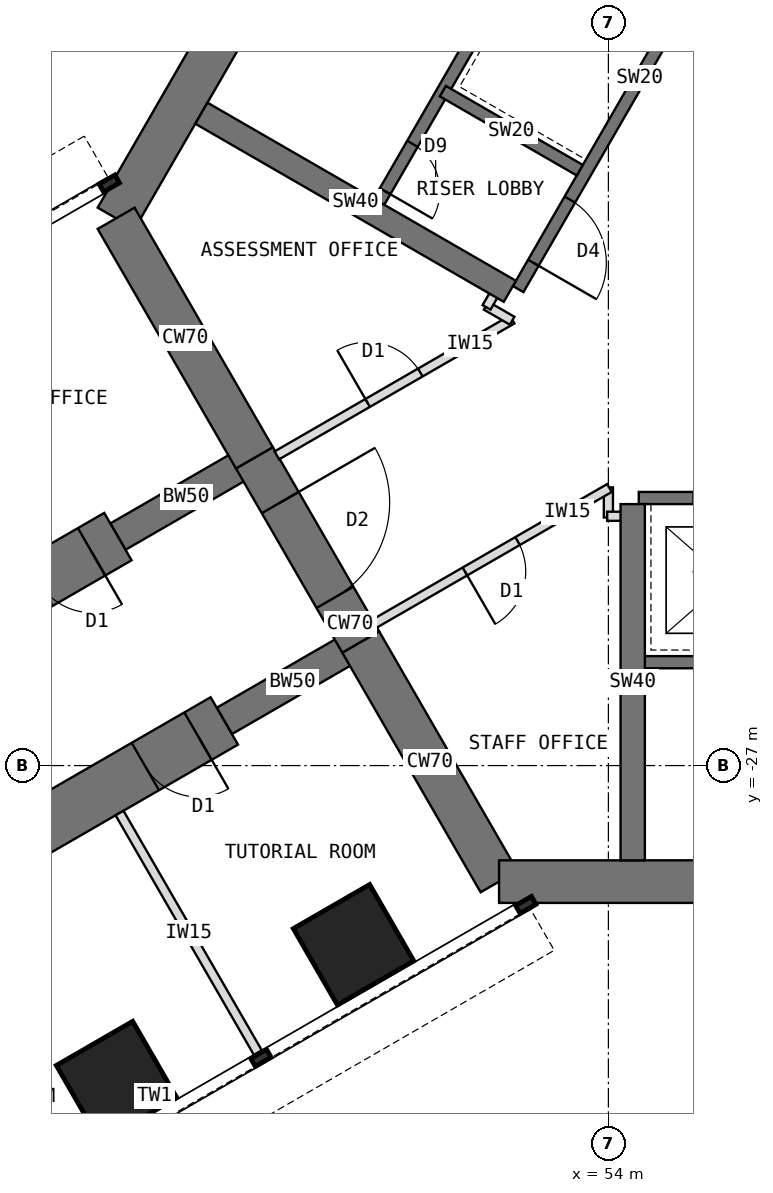
"""IFC4 building model, lengths in metres.
Left out: names, types, materials, properties, quantities, classifications, styles, units other than length and angle.
Written with IfcOpenShell. Run it as: python <this file> out.ifc"""

import sys

from ifc_helpers import new_model, si_unit, direction, frame, frame_2d, origin, origin_2d, place, context, subcontext, project, spatial, rectangle, extrude, element, fill, save


model = new_model("IFC4")
c1 = context("Model", 3, precision=1e-05, world=origin(), true_north=direction((0.0, 1.0)))
c2 = subcontext(c1, "Body", "Model", "MODEL_VIEW")
j1 = project(units=[si_unit("LENGTHUNIT", "METRE"), si_unit("PLANEANGLEUNIT", "RADIAN")], contexts=[c1])
p1 = place(None, origin())
s1 = spatial("IfcSite", under=j1, at=p1, CompositionType="ELEMENT")
p2 = place(p1, origin())
s2 = spatial("IfcBuilding", under=s1, at=p2, CompositionType="ELEMENT")
p3 = place(p2, frame((0.0, 0.0, 48.5)))
s3 = spatial("IfcBuildingStorey", under=s2, at=p3, CompositionType="ELEMENT", Elevation=48.5)
p4 = place(p3, frame((52.202, -7.092, 0.0), z_axis=(0.0, 0.0, 1.0), x_axis=(-0.500005998175, -0.866021940709, 0.0)))
e1 = element("IfcWall", 1, at=p4, inside=s3, PredefinedType="SHEAR", context=c2, shape_type="SweptSolid", body=[
    extrude(rectangle(XDim=12.596, YDim=0.7, at=frame_2d((6.298, 0.0))), origin(), (0.0, 0.0, 1.0), 4.0),
])
p5 = place(p3, frame((45.904, -18.0, 0.0), z_axis=(0.0, 0.0, 1.0), x_axis=(0.500024481964, -0.866011268655, 0.0)))
e2 = element("IfcWall", 2, at=p5, inside=s3, PredefinedType="SHEAR", context=c2, shape_type="SweptSolid", body=[
    extrude(rectangle(XDim=4.548, YDim=0.7, at=frame_2d((2.274, 0.0))), origin(), (0.0, 0.0, 1.0), 4.0),
])
p6 = place(p3, frame((48.178, -21.939, 0.0), z_axis=(0.0, 0.0, 1.0), x_axis=(0.500010275428, -0.866019471182, 0.0)))
e3 = element("IfcWall", 3, at=p6, inside=s3, PredefinedType="SHEAR", context=c2, shape_type="SweptSolid", body=[
    extrude(rectangle(XDim=3.5, YDim=0.7, at=frame_2d((1.75, 0.0))), origin(), (0.0, 0.0, 1.0), 4.0),
])
p7 = place(p6, frame((0.85, 0.0, 0.0)))
e4 = element("IfcOpeningElement", 4, at=p7, cuts=e3, PredefinedType="OPENING", context=c2, shape_type="SweptSolid", body=[
    extrude(rectangle(XDim=1.8, YDim=2.1, at=frame_2d((0.9, 1.05))), frame((0.0, 0.36, 0.0), z_axis=(0.0, -1.0, 0.0), x_axis=(1.0, 0.0, 0.0)), (0.0, 0.0, 1.0), 0.72),
])
p8 = place(p3, frame((49.928, -24.97, 0.0), z_axis=(0.0, 0.0, 1.0), x_axis=(0.499984222037, -0.866034513004, 0.0)))
e5 = element("IfcWall", 5, at=p8, inside=s3, PredefinedType="SHEAR", context=c2, shape_type="SweptSolid", body=[
    extrude(rectangle(XDim=4.548, YDim=0.7, at=frame_2d((2.274, 0.0))), origin(), (0.0, 0.0, 1.0), 4.0),
])
p9 = place(p3, frame((52.202, -28.908, 0.0), z_axis=(0.0, 0.0, 1.0), x_axis=(1.0, 0.0, 0.0)))
e6 = element("IfcWall", 6, at=p9, inside=s3, PredefinedType="SHEAR", context=c2, shape_type="SweptSolid", body=[
    extrude(rectangle(XDim=12.596, YDim=0.7, at=frame_2d((6.298, 0.0))), origin(), (0.0, 0.0, 1.0), 4.0),
])
p10 = place(p3, frame((49.928, -24.97, 0.0), z_axis=(0.0, 0.0, 1.0), x_axis=(-0.866031863473, -0.499988811324, 0.0)))
e7 = element("IfcWall", 7, at=p10, inside=s3, PredefinedType="SHEAR", context=c2, shape_type="SweptSolid", body=[
    extrude(rectangle(XDim=2.592, YDim=0.5, at=frame_2d((1.296, 0.0))), origin(), (0.0, 0.0, 1.0), 4.0),
])
p11 = place(p3, frame((47.684, -26.266, 0.0), z_axis=(0.0, 0.0, 1.0), x_axis=(-0.866027579429, -0.499996231654, 0.0)))
e8 = element("IfcWall", 8, at=p11, inside=s3, PredefinedType="SHEAR", context=c2, shape_type="SweptSolid", body=[
    extrude(rectangle(XDim=13.2, YDim=0.9, at=frame_2d((6.6, 0.0))), origin(), (0.0, 0.0, 1.0), 4.0),
])
p12 = place(p11, frame((0.5, 0.0, 0.0)))
e9 = element("IfcOpeningElement", 9, at=p12, cuts=e8, PredefinedType="OPENING", context=c2, shape_type="SweptSolid", body=[
    extrude(rectangle(XDim=1.0, YDim=2.1, at=frame_2d((0.5, 1.05))), frame((0.0, 0.46, 0.0), z_axis=(0.0, -1.0, 0.0), x_axis=(1.0, 0.0, 0.0)), (0.0, 0.0, 1.0), 0.92),
])
p13 = place(p11, frame((7.25, 0.0, 0.0)))
e10 = element("IfcOpeningElement", 10, at=p13, cuts=e8, PredefinedType="OPENING", context=c2, shape_type="SweptSolid", body=[
    extrude(rectangle(XDim=1.0, YDim=2.1, at=frame_2d((0.5, 1.05))), frame((0.0, 0.46, 0.0), z_axis=(0.0, -1.0, 0.0), x_axis=(1.0, 0.0, 0.0)), (0.0, 0.0, 1.0), 0.92),
])
p14 = place(p3, frame((48.178, -21.939, 0.0), z_axis=(0.0, 0.0, 1.0), x_axis=(-0.866072649678, -0.499918158782, 0.0)))
e11 = element("IfcWall", 11, at=p14, inside=s3, PredefinedType="SHEAR", context=c2, shape_type="SweptSolid", body=[
    extrude(rectangle(XDim=2.592, YDim=0.5, at=frame_2d((1.296, 0.0))), origin(), (0.0, 0.0, 1.0), 4.0),
])
p15 = place(p3, frame((45.934, -23.234, 0.0), z_axis=(0.0, 0.0, 1.0), x_axis=(-0.866019570528, -0.500010103361, 0.0)))
e12 = element("IfcWall", 12, at=p15, inside=s3, PredefinedType="SHEAR", context=c2, shape_type="SweptSolid", body=[
    extrude(rectangle(XDim=13.2, YDim=0.9, at=frame_2d((6.6, 0.0))), origin(), (0.0, 0.0, 1.0), 4.0),
])
p16 = place(p15, frame((0.5, 0.0, 0.0)))
e13 = element("IfcOpeningElement", 13, at=p16, cuts=e12, PredefinedType="OPENING", context=c2, shape_type="SweptSolid", body=[
    extrude(rectangle(XDim=1.0, YDim=2.1, at=frame_2d((0.5, 1.05))), frame((0.0, 0.46, 0.0), z_axis=(0.0, -1.0, 0.0), x_axis=(1.0, 0.0, 0.0)), (0.0, 0.0, 1.0), 0.92),
])
p17 = place(p15, frame((7.25, 0.0, 0.0)))
e14 = element("IfcOpeningElement", 14, at=p17, cuts=e12, PredefinedType="OPENING", context=c2, shape_type="SweptSolid", body=[
    extrude(rectangle(XDim=1.0, YDim=2.1, at=frame_2d((0.5, 1.05))), frame((0.0, 0.46, 0.0), z_axis=(0.0, -1.0, 0.0), x_axis=(1.0, 0.0, 0.0)), (0.0, 0.0, 1.0), 0.92),
])
for number, where, z_axis, x_axis in (
    (15, (49.809, -29.946, 0.0), (0.0, 0.0, 1.0), (0.866, 0.5, 0.0)),
    (16, (45.912, -32.196, 0.0), (0.0, 0.0, 1.0), (0.866, 0.5, 0.0)),
):
    element("IfcColumn", number, at=place(p3, frame(where, z_axis=z_axis, x_axis=x_axis)), inside=s3, PredefinedType="COLUMN", context=c2, shape_type="SweptSolid", body=[
        extrude(rectangle(XDim=1.45, YDim=1.45, at=origin_2d()), origin(), (0.0, 0.0, 1.0), 4.0),
    ])
p18 = place(p3, frame((56.516, -12.236, 0.0), z_axis=(0.0, 0.0, 1.0), x_axis=(-0.49999894854, -0.866026010844, 0.0)))
e17 = element("IfcWall", 17, at=p18, inside=s3, PredefinedType="SHEAR", context=c2, shape_type="SweptSolid", body=[
    extrude(rectangle(XDim=8.0, YDim=0.2, at=frame_2d((4.0, 0.0))), origin(), (0.0, 0.0, 1.0), 4.0),
])
p19 = place(p18, frame((6.3, 0.0, 0.0)))
e18 = element("IfcOpeningElement", 18, at=p19, cuts=e17, PredefinedType="OPENING", context=c2, shape_type="SweptSolid", body=[
    extrude(rectangle(XDim=1.2, YDim=2.1, at=frame_2d((0.6, 1.05))), frame((0.0, 0.11, 0.0), z_axis=(0.0, -1.0, 0.0), x_axis=(1.0, 0.0, 0.0)), (0.0, 0.0, 1.0), 0.22),
])
p20 = place(p3, frame((53.53, -17.209, 0.0), z_axis=(0.0, 0.0, 1.0), x_axis=(-0.866062058628, 0.499936506574, 0.0)))
e19 = element("IfcWall", 19, at=p20, inside=s3, PredefinedType="SHEAR", context=c2, shape_type="SweptSolid", body=[
    extrude(rectangle(XDim=2.6, YDim=0.2, at=frame_2d((1.3, 0.0))), origin(), (0.0, 0.0, 1.0), 4.0),
])
p21 = place(p3, frame((54.178, -10.886, 0.0), z_axis=(0.0, 0.0, 1.0), x_axis=(-0.49999894854, -0.866026010844, 0.0)))
e20 = element("IfcWall", 20, at=p21, inside=s3, PredefinedType="SHEAR", context=c2, shape_type="SweptSolid", body=[
    extrude(rectangle(XDim=8.0, YDim=0.2, at=frame_2d((4.0, 0.0))), origin(), (0.0, 0.0, 1.0), 4.0),
])
p22 = place(p21, frame((6.8, 0.0, 0.0)))
e21 = element("IfcOpeningElement", 21, at=p22, cuts=e20, PredefinedType="OPENING", context=c2, shape_type="SweptSolid", body=[
    extrude(rectangle(XDim=0.9, YDim=2.1, at=frame_2d((0.45, 1.05))), frame((0.0, 0.11, 0.0), z_axis=(0.0, -1.0, 0.0), x_axis=(1.0, 0.0, 0.0)), (0.0, 0.0, 1.0), 0.22),
])
p23 = place(p3, frame((52.38, -19.201, 0.0), z_axis=(0.0, 0.0, 1.0), x_axis=(-0.866023886965, 0.500002627198, 0.0)))
e22 = element("IfcWall", 22, at=p23, inside=s3, PredefinedType="SHEAR", context=c2, shape_type="SweptSolid", body=[
    extrude(rectangle(XDim=5.858, YDim=0.4, at=frame_2d((2.929, 0.0))), origin(), (0.0, 0.0, 1.0), 4.0),
])
p24 = place(p3, frame((54.5, -22.6, 0.0), z_axis=(0.0, 0.0, 1.0), x_axis=(1.0, 0.0, 0.0)))
e23 = element("IfcWall", 23, at=p24, inside=s3, PredefinedType="SHEAR", context=c2, shape_type="SweptSolid", body=[
    extrude(rectangle(XDim=8.0, YDim=0.2, at=frame_2d((4.0, 0.0))), origin(), (0.0, 0.0, 1.0), 4.0),
])
p25 = place(p24, frame((6.3, 0.0, 0.0)))
e24 = element("IfcOpeningElement", 24, at=p25, cuts=e23, PredefinedType="OPENING", context=c2, shape_type="SweptSolid", body=[
    extrude(rectangle(XDim=1.2, YDim=2.1, at=frame_2d((0.6, 1.05))), frame((0.0, 0.11, 0.0), z_axis=(0.0, -1.0, 0.0), x_axis=(1.0, 0.0, 0.0)), (0.0, 0.0, 1.0), 0.22),
])
p26 = place(p24, frame((0.9, 0.0, 0.0)))
e25 = element("IfcOpeningElement", 25, at=p26, cuts=e23, PredefinedType="OPENING", context=c2, shape_type="SweptSolid", body=[
    extrude(rectangle(XDim=1.1, YDim=2.2, at=frame_2d((0.55, 1.1))), frame((0.0, 0.11, 0.0), z_axis=(0.0, -1.0, 0.0), x_axis=(1.0, 0.0, 0.0)), (0.0, 0.0, 1.0), 0.22),
])
p27 = place(p3, frame((54.5, -25.3, 0.0), z_axis=(0.0, 0.0, 1.0), x_axis=(1.0, 0.0, 0.0)))
e26 = element("IfcWall", 26, at=p27, inside=s3, PredefinedType="SHEAR", context=c2, shape_type="SweptSolid", body=[
    extrude(rectangle(XDim=8.0, YDim=0.2, at=frame_2d((4.0, 0.0))), origin(), (0.0, 0.0, 1.0), 4.0),
])
p28 = place(p27, frame((6.7, 0.0, 0.0)))
e27 = element("IfcOpeningElement", 27, at=p28, cuts=e26, PredefinedType="OPENING", context=c2, shape_type="SweptSolid", body=[
    extrude(rectangle(XDim=1.1, YDim=2.1, at=frame_2d((0.55, 1.05))), frame((0.0, 0.11, 0.0), z_axis=(0.0, -1.0, 0.0), x_axis=(1.0, 0.0, 0.0)), (0.0, 0.0, 1.0), 0.22),
])
p29 = place(p3, frame((54.4, -22.7, 0.0), z_axis=(0.0, 0.0, 1.0), x_axis=(0.0, -1.0, 0.0)))
e28 = element("IfcWall", 28, at=p29, inside=s3, PredefinedType="SHEAR", context=c2, shape_type="SweptSolid", body=[
    extrude(rectangle(XDim=5.858, YDim=0.4, at=frame_2d((2.929, 0.0))), origin(), (0.0, 0.0, 1.0), 4.0),
])
p30 = place(p3, frame((45.96, -27.78, 0.0), z_axis=(0.0, 0.0, 1.0), x_axis=(0.499982560684, -0.866035472144, 0.0)))
e29 = element("IfcWall", 29, at=p30, inside=s3, PredefinedType="PARTITIONING", context=c2, shape_type="SweptSolid", body=[
    extrude(rectangle(XDim=4.55, YDim=0.15, at=frame_2d((2.275, 0.0))), origin(), (0.0, 0.0, 1.0), 3.8),
])
p31 = place(p3, frame((54.0, -22.92, 0.0), z_axis=(0.0, 0.0, 1.0), x_axis=(0.0, 1.0, 0.0)))
e30 = element("IfcWall", 30, at=p31, inside=s3, PredefinedType="PARTITIONING", context=c2, shape_type="SweptSolid", body=[
    extrude(rectangle(XDim=0.494, YDim=0.15, at=frame_2d((0.247, 0.0))), origin(), (0.0, 0.0, 1.0), 3.8),
])
p32 = place(p3, frame((54.017, -22.436, 0.0), z_axis=(0.0, 0.0, 1.0), x_axis=(-0.866015446554, -0.500017246033, 0.0)))
e31 = element("IfcWall", 31, at=p32, inside=s3, PredefinedType="PARTITIONING", context=c2, shape_type="SweptSolid", body=[
    extrude(rectangle(XDim=4.469, YDim=0.15, at=frame_2d((2.234, 0.0))), origin(), (0.0, 0.0, 1.0), 3.8),
])
p33 = place(p32, frame((1.744, 0.0, 0.0)))
e32 = element("IfcOpeningElement", 32, at=p33, cuts=e31, PredefinedType="OPENING", context=c2, shape_type="SweptSolid", body=[
    extrude(rectangle(XDim=1.0, YDim=2.1, at=frame_2d((0.5, 1.05))), frame((0.0, 0.085, 0.0), z_axis=(0.0, -1.0, 0.0), x_axis=(1.0, 0.0, 0.0)), (0.0, 0.0, 1.0), 0.17),
])
p34 = place(p3, frame((48.548, -21.898, 0.0), z_axis=(0.0, 0.0, 1.0), x_axis=(0.866025445582, 0.499999927604, 0.0)))
e33 = element("IfcWall", 33, at=p34, inside=s3, PredefinedType="PARTITIONING", context=c2, shape_type="SweptSolid", body=[
    extrude(rectangle(XDim=4.468, YDim=0.15, at=frame_2d((2.234, 0.0))), origin(), (0.0, 0.0, 1.0), 3.8),
])
p35 = place(p34, frame((1.724, 0.0, 0.0)))
e34 = element("IfcOpeningElement", 34, at=p35, cuts=e33, PredefinedType="OPENING", context=c2, shape_type="SweptSolid", body=[
    extrude(rectangle(XDim=1.0, YDim=2.1, at=frame_2d((0.5, 1.05))), frame((0.0, 0.085, 0.0), z_axis=(0.0, -1.0, 0.0), x_axis=(1.0, 0.0, 0.0)), (0.0, 0.0, 1.0), 0.17),
])
p36 = place(p3, frame((52.417, -19.684, 0.0), z_axis=(0.0, 0.0, 1.0), x_axis=(-0.865831790172, 0.50033519877, 0.0)))
e35 = element("IfcWall", 35, at=p36, inside=s3, PredefinedType="PARTITIONING", context=c2, shape_type="SweptSolid", body=[
    extrude(rectangle(XDim=0.494, YDim=0.15, at=frame_2d((0.247, 0.0))), origin(), (0.0, 0.0, 1.0), 3.8),
])
for number, where, z_axis, x_axis in (
    (36, (51.997, -19.464, 0.0), (0.0, 0.0, 1.0), (0.5, 0.866, 0.0)),
    (37, (54.41, -22.9, 0.0), (0.0, 0.0, 1.0), (-1.0, 0.0, 0.0)),
):
    element("IfcWall", number, at=place(p3, frame(where, z_axis=z_axis, x_axis=x_axis)), inside=s3, PredefinedType="PARTITIONING", context=c2, shape_type="SweptSolid", body=[
        extrude(rectangle(XDim=0.43, YDim=0.15, at=frame_2d((0.215, 0.0))), origin(), (0.0, 0.0, 1.0), 3.8),
    ])
p37 = place(p19, origin())
e38 = element("IfcDoor", 38, at=p37, inside=s3, OperationType="SINGLE_SWING_RIGHT", PredefinedType="DOOR", context=c2, shape_type="SweptSolid", body=[
    extrude(rectangle(XDim=1.2, YDim=2.1, at=frame_2d((0.6, 1.05))), frame((0.0, 0.025, 0.0), z_axis=(0.0, -1.0, 0.0), x_axis=(1.0, 0.0, 0.0)), (0.0, 0.0, 1.0), 0.05),
])
fill(e18, e38)
p38 = place(p22, origin())
e39 = element("IfcDoor", 39, at=p38, inside=s3, OperationType="SINGLE_SWING_RIGHT", PredefinedType="DOOR", context=c2, shape_type="SweptSolid", body=[
    extrude(rectangle(XDim=0.9, YDim=2.1, at=frame_2d((0.45, 1.05))), frame((0.0, 0.025, 0.0), z_axis=(0.0, -1.0, 0.0), x_axis=(1.0, 0.0, 0.0)), (0.0, 0.0, 1.0), 0.05),
])
fill(e21, e39)
p39 = place(p7, origin())
e40 = element("IfcDoor", 40, at=p39, inside=s3, OperationType="DOUBLE_DOOR_DOUBLE_SWING", PredefinedType="DOOR", context=c2, shape_type="SweptSolid", body=[
    extrude(rectangle(XDim=1.72, YDim=2.06, at=frame_2d((0.9, 1.03))), frame((0.0, 0.025, 0.0), z_axis=(0.0, -1.0, 0.0), x_axis=(1.0, 0.0, 0.0)), (0.0, 0.0, 1.0), 0.05),
    extrude(rectangle(XDim=0.04, YDim=2.1, at=frame_2d((0.02, 1.05))), frame((0.0, 0.35, 0.0), z_axis=(0.0, -1.0, 0.0), x_axis=(1.0, 0.0, 0.0)), (0.0, 0.0, 1.0), 0.699),
    extrude(rectangle(XDim=0.04, YDim=2.1, at=frame_2d((1.78, 1.05))), frame((0.0, 0.35, 0.0), z_axis=(0.0, -1.0, 0.0), x_axis=(1.0, 0.0, 0.0)), (0.0, 0.0, 1.0), 0.699),
    extrude(rectangle(XDim=1.72, YDim=0.04, at=frame_2d((0.9, 2.08))), frame((0.0, 0.35, 0.0), z_axis=(0.0, -1.0, 0.0), x_axis=(1.0, 0.0, 0.0)), (0.0, 0.0, 1.0), 0.699),
])
fill(e4, e40)
p40 = place(p35, origin())
e41 = element("IfcDoor", 41, at=p40, inside=s3, OperationType="SINGLE_SWING_LEFT", PredefinedType="DOOR", context=c2, shape_type="SweptSolid", body=[
    extrude(rectangle(XDim=1.0, YDim=2.1, at=frame_2d((0.5, 1.05))), frame((0.0, 0.025, 0.0), z_axis=(0.0, -1.0, 0.0), x_axis=(1.0, 0.0, 0.0)), (0.0, 0.0, 1.0), 0.05),
])
fill(e34, e41)
p41 = place(p33, origin())
e42 = element("IfcDoor", 42, at=p41, inside=s3, OperationType="SINGLE_SWING_RIGHT", PredefinedType="DOOR", context=c2, shape_type="SweptSolid", body=[
    extrude(rectangle(XDim=1.0, YDim=2.1, at=frame_2d((0.5, 1.05))), frame((0.0, 0.025, 0.0), z_axis=(0.0, -1.0, 0.0), x_axis=(1.0, 0.0, 0.0)), (0.0, 0.0, 1.0), 0.05),
])
fill(e32, e42)
p42 = place(p12, origin())
e43 = element("IfcDoor", 43, at=p42, inside=s3, OperationType="SINGLE_SWING_LEFT", PredefinedType="DOOR", context=c2, shape_type="SweptSolid", body=[
    extrude(rectangle(XDim=0.92, YDim=2.06, at=frame_2d((0.5, 1.03))), frame((0.0, 0.025, 0.0), z_axis=(0.0, -1.0, 0.0), x_axis=(1.0, 0.0, 0.0)), (0.0, 0.0, 1.0), 0.05),
    extrude(rectangle(XDim=0.04, YDim=2.1, at=frame_2d((0.02, 1.05))), frame((0.0, 0.45, 0.0), z_axis=(0.0, -1.0, 0.0), x_axis=(1.0, 0.0, 0.0)), (0.0, 0.0, 1.0), 0.899),
    extrude(rectangle(XDim=0.04, YDim=2.1, at=frame_2d((0.98, 1.05))), frame((0.0, 0.45, 0.0), z_axis=(0.0, -1.0, 0.0), x_axis=(1.0, 0.0, 0.0)), (0.0, 0.0, 1.0), 0.899),
    extrude(rectangle(XDim=0.92, YDim=0.04, at=frame_2d((0.5, 2.08))), frame((0.0, 0.45, 0.0), z_axis=(0.0, -1.0, 0.0), x_axis=(1.0, 0.0, 0.0)), (0.0, 0.0, 1.0), 0.899),
])
fill(e9, e43)
p43 = place(p16, origin())
e44 = element("IfcDoor", 44, at=p43, inside=s3, OperationType="SINGLE_SWING_LEFT", PredefinedType="DOOR", context=c2, shape_type="SweptSolid", body=[
    extrude(rectangle(XDim=0.92, YDim=2.06, at=frame_2d((0.5, 1.03))), frame((0.0, 0.025, 0.0), z_axis=(0.0, -1.0, 0.0), x_axis=(1.0, 0.0, 0.0)), (0.0, 0.0, 1.0), 0.05),
    extrude(rectangle(XDim=0.04, YDim=2.1, at=frame_2d((0.02, 1.05))), frame((0.0, 0.45, 0.0), z_axis=(0.0, -1.0, 0.0), x_axis=(1.0, 0.0, 0.0)), (0.0, 0.0, 1.0), 0.899),
    extrude(rectangle(XDim=0.04, YDim=2.1, at=frame_2d((0.98, 1.05))), frame((0.0, 0.45, 0.0), z_axis=(0.0, -1.0, 0.0), x_axis=(1.0, 0.0, 0.0)), (0.0, 0.0, 1.0), 0.899),
    extrude(rectangle(XDim=0.92, YDim=0.04, at=frame_2d((0.5, 2.08))), frame((0.0, 0.45, 0.0), z_axis=(0.0, -1.0, 0.0), x_axis=(1.0, 0.0, 0.0)), (0.0, 0.0, 1.0), 0.899),
])
fill(e13, e44)
save(model, sys.argv[1])
